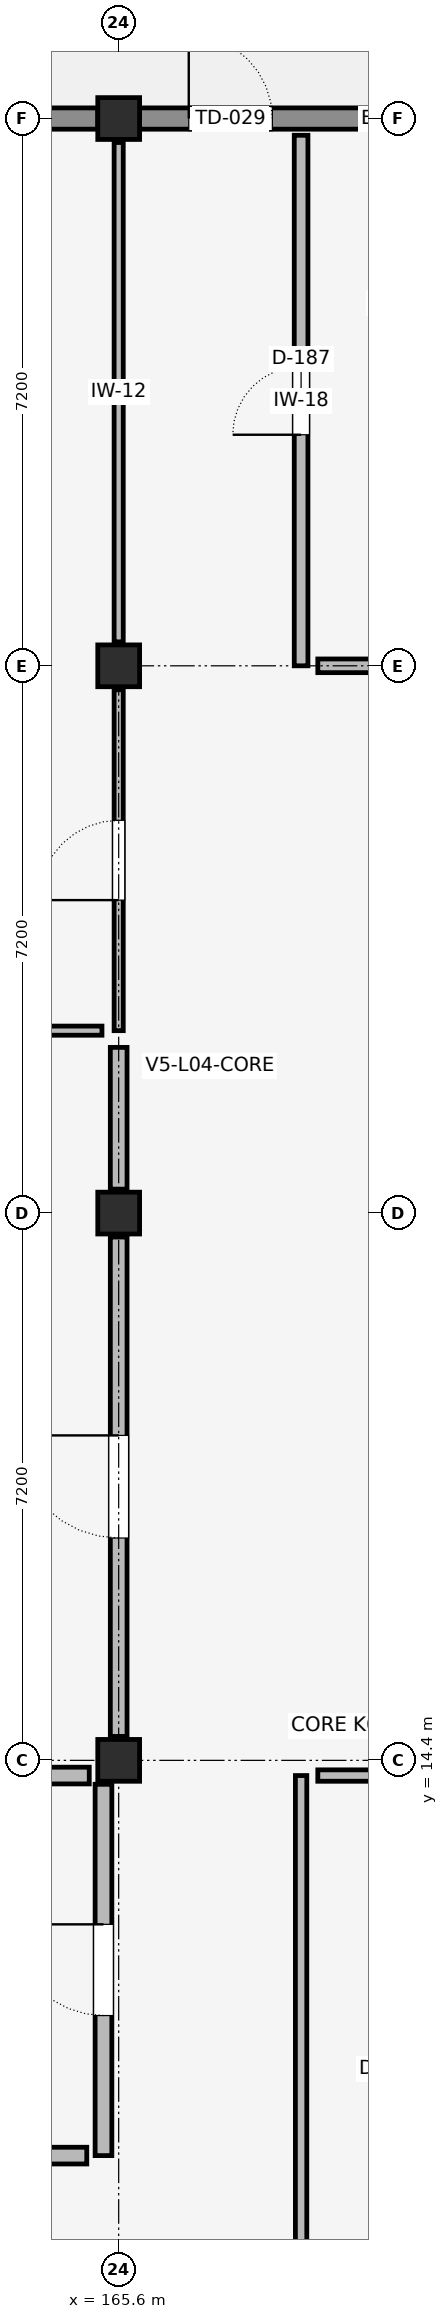
"""IFC4 building model, lengths in metres.
Left out: names, types, materials, properties, quantities, classifications, styles, units other than length and angle.
Written with IfcOpenShell. Run it as: python <this file> out.ifc"""

import sys

from ifc_helpers import new_model, si_unit, direction, frame, frame_2d, origin, origin_2d, place, context, subcontext, project, spatial, rectangle, extrude, element, fill, save


model = new_model("IFC4")
c1 = context("Model", 3, precision=1e-05, world=origin(), true_north=direction((0.0, 1.0)))
c2 = subcontext(c1, "Body", "Model", "MODEL_VIEW")
j1 = project(units=[si_unit("LENGTHUNIT", "METRE"), si_unit("PLANEANGLEUNIT", "RADIAN")], contexts=[c1])
p1 = place(None, origin())
s1 = spatial("IfcSite", under=j1, at=p1, CompositionType="ELEMENT")
p2 = place(p1, origin())
s2 = spatial("IfcBuilding", under=s1, at=p2, CompositionType="ELEMENT")
p3 = place(p2, frame((0.0, 0.0, 17.4)))
s3 = spatial("IfcBuildingStorey", under=s2, at=p3, CompositionType="ELEMENT", Elevation=17.4)
for number, where, z_axis, x_axis in (
    (1, (165.6, 14.4, 0.0), (0.0, 0.0, 1.0), (1.0, 0.0, 0.0)),
    (2, (165.6, 21.6, 0.0), (0.0, 0.0, 1.0), (1.0, 0.0, 0.0)),
    (3, (165.6, 28.8, 0.0), (0.0, 0.0, 1.0), (1.0, 0.0, 0.0)),
    (4, (165.6, 36.0, 0.0), (0.0, 0.0, 1.0), (1.0, 0.0, 0.0)),
):
    element("IfcColumn", number, at=place(p3, frame(where, z_axis=z_axis, x_axis=x_axis)), inside=s3, PredefinedType="COLUMN", context=c2, shape_type="SweptSolid", body=[
        extrude(rectangle(XDim=0.55, YDim=0.55, at=origin_2d()), origin(), (0.0, 0.0, 1.0), 3.9),
    ])
p4 = place(p3, frame((172.525, 36.0, 0.0), z_axis=(0.0, 0.0, 1.0), x_axis=(-1.0, 0.0, 0.0)))
e5 = element("IfcWall", 5, at=p4, inside=s3, PredefinedType="ELEMENTEDWALL", context=c2, shape_type="SweptSolid", body=[
    extrude(rectangle(XDim=6.65, YDim=0.28, at=frame_2d((3.325, 0.0))), origin(), (0.0, 0.0, 1.0), 2.9),
])
p5 = place(p4, frame((4.903, 0.0, 0.0)))
e6 = element("IfcOpeningElement", 6, at=p5, cuts=e5, PredefinedType="OPENING", context=c2, shape_type="SweptSolid", body=[
    extrude(rectangle(XDim=1.1, YDim=2.15, at=frame_2d((0.55, 1.075))), frame((0.0, 0.152, 0.0), z_axis=(0.0, -1.0, 0.0), x_axis=(1.0, 0.0, 0.0)), (0.0, 0.0, 1.0), 0.304),
])
p6 = place(p3, frame((165.325, 36.0, 0.0), z_axis=(0.0, 0.0, 1.0), x_axis=(-1.0, 0.0, 0.0)))
e7 = element("IfcWall", 7, at=p6, inside=s3, PredefinedType="ELEMENTEDWALL", context=c2, shape_type="SweptSolid", body=[
    extrude(rectangle(XDim=6.65, YDim=0.28, at=frame_2d((3.325, 0.0))), origin(), (0.0, 0.0, 1.0), 2.95),
])
p7 = place(p3, frame((165.4, 9.2, 0.0), z_axis=(0.0, 0.0, 1.0), x_axis=(0.0, 1.0, 0.0)))
e8 = element("IfcWall", 8, at=p7, inside=s3, PredefinedType="STANDARD", context=c2, shape_type="SweptSolid", body=[
    extrude(rectangle(XDim=4.885, YDim=0.22, at=frame_2d((2.442, 0.0))), origin(), (0.0, 0.0, 1.0), 2.958),
])
p8 = place(p7, frame((1.843, 0.0, 0.0)))
e9 = element("IfcOpeningElement", 9, at=p8, cuts=e8, PredefinedType="OPENING", context=c2, shape_type="SweptSolid", body=[
    extrude(rectangle(XDim=1.2, YDim=2.2, at=frame_2d((0.6, 1.1))), frame((0.0, 0.122, 0.0), z_axis=(0.0, -1.0, 0.0), x_axis=(1.0, 0.0, 0.0)), (0.0, 0.0, 1.0), 0.244),
])
p9 = place(p3, frame((161.6, 9.2, 0.0), z_axis=(0.0, 0.0, 1.0), x_axis=(1.0, 0.0, 0.0)))
e10 = element("IfcWall", 10, at=p9, inside=s3, PredefinedType="STANDARD", context=c2, shape_type="SweptSolid", body=[
    extrude(rectangle(XDim=3.58, YDim=0.22, at=frame_2d((1.79, 0.0))), origin(), (0.0, 0.0, 1.0), 3.612),
])
p10 = place(p3, frame((161.6, 14.2, 0.0), z_axis=(0.0, 0.0, 1.0), x_axis=(1.0, 0.0, 0.0)))
e11 = element("IfcWall", 11, at=p10, inside=s3, PredefinedType="STANDARD", context=c2, shape_type="SweptSolid", body=[
    extrude(rectangle(XDim=3.613, YDim=0.22, at=frame_2d((1.806, 0.0))), origin(), (0.0, 0.0, 1.0), 2.908),
])
p11 = place(p3, frame((165.6, 24.0, 0.0), z_axis=(0.0, 0.0, 1.0), x_axis=(0.0, 1.0, 0.0)))
e12 = element("IfcWall", 12, at=p11, inside=s3, PredefinedType="PARTITIONING", context=c2, shape_type="SweptSolid", body=[
    extrude(rectangle(XDim=4.485, YDim=0.12, at=frame_2d((2.243, 0.0))), origin(), (0.0, 0.0, 1.0), 2.958),
])
p12 = place(p11, frame((1.718, 0.0, 0.0)))
e13 = element("IfcOpeningElement", 13, at=p12, cuts=e12, PredefinedType="OPENING", context=c2, shape_type="SweptSolid", body=[
    extrude(rectangle(XDim=1.05, YDim=2.15, at=frame_2d((0.525, 1.075))), frame((0.0, 0.072, 0.0), z_axis=(0.0, -1.0, 0.0), x_axis=(1.0, 0.0, 0.0)), (0.0, 0.0, 1.0), 0.144),
])
p13 = place(p3, frame((165.6, 29.115, 0.0), z_axis=(0.0, 0.0, 1.0), x_axis=(0.0, 1.0, 0.0)))
e14 = element("IfcWall", 14, at=p13, inside=s3, PredefinedType="PARTITIONING", context=c2, shape_type="SweptSolid", body=[
    extrude(rectangle(XDim=6.57, YDim=0.12, at=frame_2d((3.285, 0.0))), origin(), (0.0, 0.0, 1.0), 3.048),
])
p14 = place(p3, frame((158.82, 24.0, 0.0), z_axis=(0.0, 0.0, 1.0), x_axis=(1.0, 0.0, 0.0)))
e15 = element("IfcWall", 15, at=p14, inside=s3, PredefinedType="PARTITIONING", context=c2, shape_type="SweptSolid", body=[
    extrude(rectangle(XDim=6.56, YDim=0.12, at=frame_2d((3.28, 0.0))), origin(), (0.0, 0.0, 1.0), 3.058),
])
p15 = place(p3, frame((165.6, 14.715, 0.0), z_axis=(0.0, 0.0, 1.0), x_axis=(0.0, 1.0, 0.0)))
e16 = element("IfcWall", 16, at=p15, inside=s3, PredefinedType="STANDARD", context=c2, shape_type="SweptSolid", body=[
    extrude(rectangle(XDim=6.57, YDim=0.22, at=frame_2d((3.285, 0.0))), origin(), (0.0, 0.0, 1.0), 3.008),
])
p16 = place(p15, frame((2.61, 0.0, 0.0)))
e17 = element("IfcOpeningElement", 17, at=p16, cuts=e16, PredefinedType="OPENING", context=c2, shape_type="SweptSolid", body=[
    extrude(rectangle(XDim=1.35, YDim=2.2, at=frame_2d((0.675, 1.1))), frame((0.0, 0.122, 0.0), z_axis=(0.0, -1.0, 0.0), x_axis=(1.0, 0.0, 0.0)), (0.0, 0.0, 1.0), 0.244),
])
p17 = place(p3, frame((165.6, 21.915, 0.0), z_axis=(0.0, 0.0, 1.0), x_axis=(0.0, 1.0, 0.0)))
e18 = element("IfcWall", 18, at=p17, inside=s3, PredefinedType="STANDARD", context=c2, shape_type="SweptSolid", body=[
    extrude(rectangle(XDim=1.865, YDim=0.22, at=frame_2d((0.933, 0.0))), origin(), (0.0, 0.0, 1.0), 2.958),
])
p18 = place(p3, frame((168.0, 28.8, 0.0), z_axis=(0.0, 0.0, 1.0), x_axis=(0.0, 1.0, 0.0)))
e19 = element("IfcWall", 19, at=p18, inside=s3, PredefinedType="PLUMBINGWALL", context=c2, shape_type="SweptSolid", body=[
    extrude(rectangle(XDim=6.98, YDim=0.18, at=frame_2d((3.49, 0.0))), origin(), (0.0, 0.0, 1.0), 2.898),
])
p19 = place(p18, frame((3.04, 0.0, 0.0)))
e20 = element("IfcOpeningElement", 20, at=p19, cuts=e19, PredefinedType="OPENING", context=c2, shape_type="SweptSolid", body=[
    extrude(rectangle(XDim=0.9, YDim=2.1, at=frame_2d((0.45, 1.05))), frame((0.0, 0.102, 0.0), z_axis=(0.0, -1.0, 0.0), x_axis=(1.0, 0.0, 0.0)), (0.0, 0.0, 1.0), 0.204),
])
p20 = place(p3, frame((168.22, 28.8, 0.0), z_axis=(0.0, 0.0, 1.0), x_axis=(1.0, 0.0, 0.0)))
e21 = element("IfcWall", 21, at=p20, inside=s3, PredefinedType="PLUMBINGWALL", context=c2, shape_type="SweptSolid", body=[
    extrude(rectangle(XDim=4.265, YDim=0.18, at=frame_2d((2.133, 0.0))), origin(), (0.0, 0.0, 1.0), 2.908),
])
p21 = place(p3, frame((168.0, 0.0, 0.0), z_axis=(0.0, 0.0, 1.0), x_axis=(0.0, 1.0, 0.0)))
e22 = element("IfcWall", 22, at=p21, inside=s3, PredefinedType="STANDARD", context=c2, shape_type="SweptSolid", body=[
    extrude(rectangle(XDim=14.2, YDim=0.15, at=frame_2d((7.1, 0.0))), origin(), (0.0, 0.0, 1.0), 2.908),
])
p22 = place(p21, frame((6.575, 0.0, 0.0)))
e23 = element("IfcOpeningElement", 23, at=p22, cuts=e22, PredefinedType="OPENING", context=c2, shape_type="SweptSolid", body=[
    extrude(rectangle(XDim=1.05, YDim=2.15, at=frame_2d((0.525, 1.075))), frame((0.0, 0.087, 0.0), z_axis=(0.0, -1.0, 0.0), x_axis=(1.0, 0.0, 0.0)), (0.0, 0.0, 1.0), 0.174),
])
p23 = place(p3, frame((168.22, 14.2, 0.0), z_axis=(0.0, 0.0, 1.0), x_axis=(1.0, 0.0, 0.0)))
e24 = element("IfcWall", 24, at=p23, inside=s3, PredefinedType="STANDARD", context=c2, shape_type="SweptSolid", body=[
    extrude(rectangle(XDim=4.265, YDim=0.15, at=frame_2d((2.133, 0.0))), origin(), (0.0, 0.0, 1.0), 3.612),
])
p24 = place(p5, frame((1.1, 0.0, 0.0), z_axis=(0.0, 0.0, 1.0), x_axis=(-1.0, 0.0, 0.0)))
e25 = element("IfcDoor", 25, at=p24, inside=s3, OperationType="SINGLE_SWING_LEFT", PredefinedType="DOOR", context=c2, shape_type="SweptSolid", body=[
    extrude(rectangle(XDim=1.1, YDim=2.15, at=frame_2d((0.55, 1.075))), frame((0.0, 0.025, 0.0), z_axis=(0.0, -1.0, 0.0), x_axis=(1.0, 0.0, 0.0)), (0.0, 0.0, 1.0), 0.05),
])
fill(e6, e25)
p25 = place(p8, origin())
e26 = element("IfcDoor", 26, at=p25, inside=s3, OperationType="SINGLE_SWING_RIGHT", PredefinedType="DOOR", context=c2, shape_type="SweptSolid", body=[
    extrude(rectangle(XDim=1.2, YDim=2.2, at=frame_2d((0.6, 1.1))), frame((0.0, 0.025, 0.0), z_axis=(0.0, -1.0, 0.0), x_axis=(1.0, 0.0, 0.0)), (0.0, 0.0, 1.0), 0.05),
])
fill(e9, e26)
p26 = place(p12, origin())
e27 = element("IfcDoor", 27, at=p26, inside=s3, OperationType="SINGLE_SWING_LEFT", PredefinedType="DOOR", context=c2, shape_type="SweptSolid", body=[
    extrude(rectangle(XDim=1.05, YDim=2.15, at=frame_2d((0.525, 1.075))), frame((0.0, 0.025, 0.0), z_axis=(0.0, -1.0, 0.0), x_axis=(1.0, 0.0, 0.0)), (0.0, 0.0, 1.0), 0.05),
])
fill(e13, e27)
p27 = place(p16, origin())
e28 = element("IfcDoor", 28, at=p27, inside=s3, OperationType="SINGLE_SWING_RIGHT", PredefinedType="DOOR", context=c2, shape_type="SweptSolid", body=[
    extrude(rectangle(XDim=1.35, YDim=2.2, at=frame_2d((0.675, 1.1))), frame((0.0, 0.025, 0.0), z_axis=(0.0, -1.0, 0.0), x_axis=(1.0, 0.0, 0.0)), (0.0, 0.0, 1.0), 0.05),
])
fill(e17, e28)
p28 = place(p19, origin())
e29 = element("IfcDoor", 29, at=p28, inside=s3, OperationType="SINGLE_SWING_LEFT", PredefinedType="DOOR", context=c2, shape_type="SweptSolid", body=[
    extrude(rectangle(XDim=0.9, YDim=2.1, at=frame_2d((0.45, 1.05))), frame((0.0, 0.025, 0.0), z_axis=(0.0, -1.0, 0.0), x_axis=(1.0, 0.0, 0.0)), (0.0, 0.0, 1.0), 0.05),
])
fill(e20, e29)
save(model, sys.argv[1])
